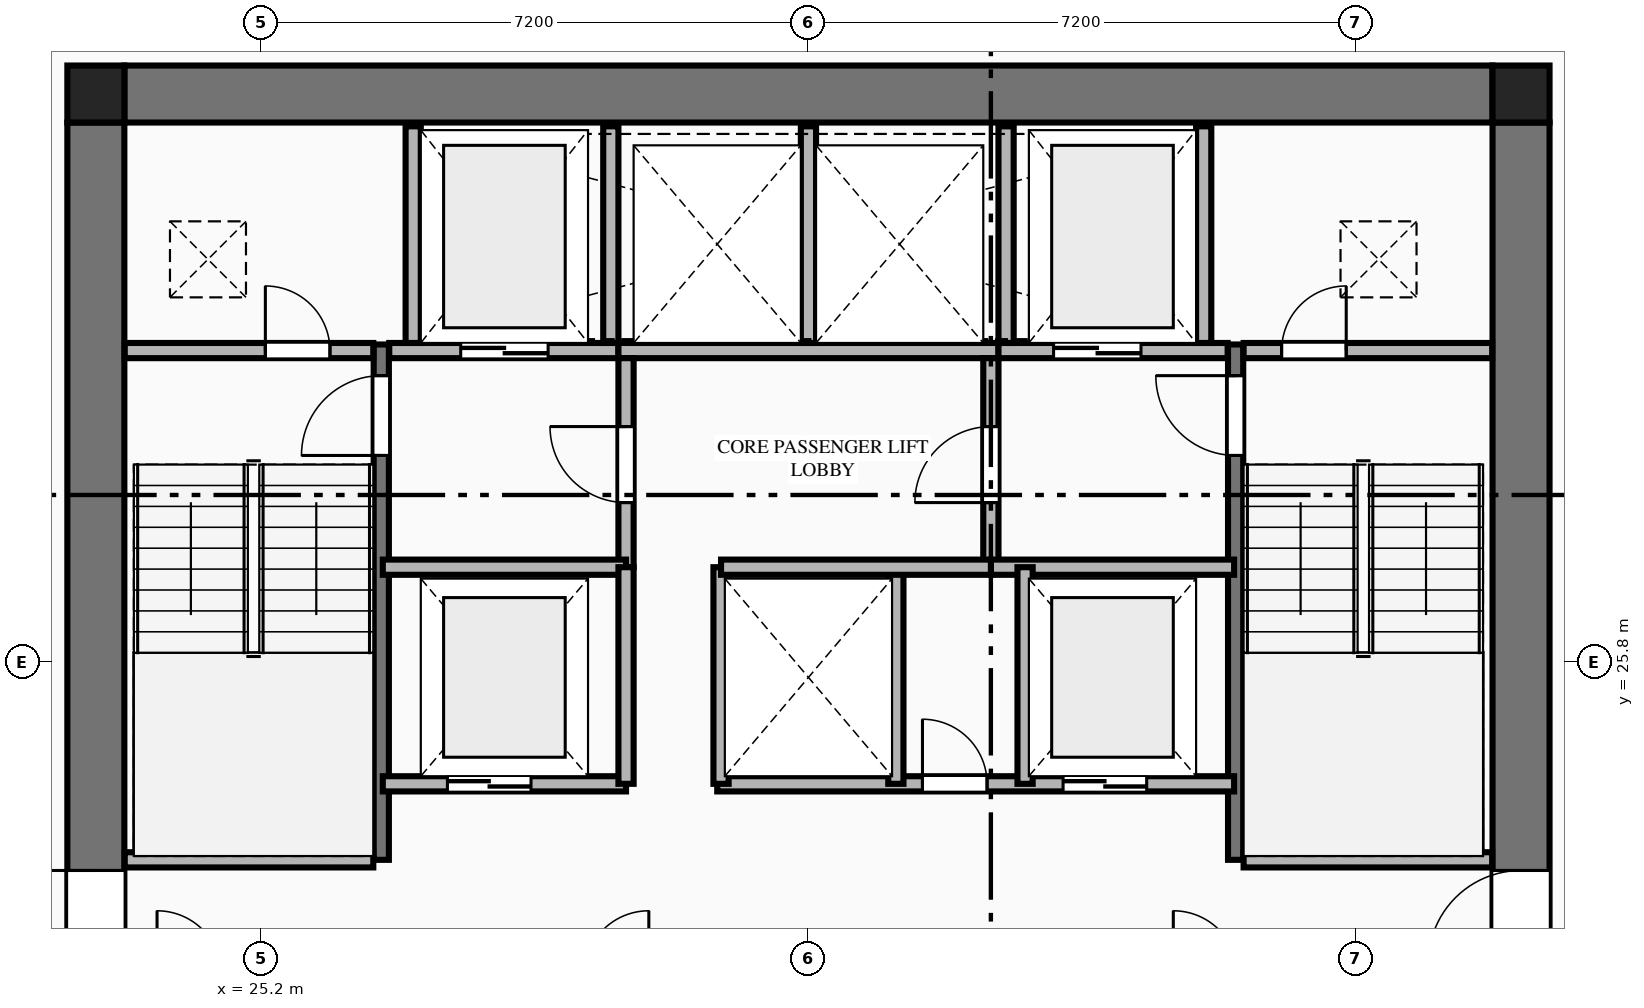
"""IFC4 building model, lengths in metres.
Left out: names, types, materials, properties, quantities, classifications, styles, units other than length and angle.
Written with IfcOpenShell. Run it as: python <this file> out.ifc"""

import sys

from ifc_helpers import new_model, si_unit, direction, frame, frame_2d, origin, origin_2d, place, context, subcontext, project, spatial, rectangle, extrude, element, fill, save


model = new_model("IFC4")
c1 = context("Model", 3, precision=1e-05, world=origin(), true_north=direction((0.0, 1.0)))
c2 = subcontext(c1, "Body", "Model", "MODEL_VIEW")
j1 = project(units=[si_unit("LENGTHUNIT", "METRE"), si_unit("PLANEANGLEUNIT", "RADIAN")], contexts=[c1])
p1 = place(None, origin())
s1 = spatial("IfcSite", under=j1, at=p1, CompositionType="ELEMENT")
p2 = place(p1, origin())
s2 = spatial("IfcBuilding", under=s1, at=p2, CompositionType="ELEMENT")
p3 = place(p2, frame((0.0, 0.0, 126.8)))
s3 = spatial("IfcBuildingStorey", under=s2, at=p3, CompositionType="ELEMENT", Elevation=126.8)
for number, where, z_axis, x_axis in (
    (1, (41.775, 33.275, 0.0), (0.0, 0.0, 1.0), (1.0, 0.0, 0.0)),
    (2, (23.025, 33.275, 0.0), (0.0, 0.0, 1.0), (1.0, 0.0, 0.0)),
):
    element("IfcColumn", number, at=place(p3, frame(where, z_axis=z_axis, x_axis=x_axis)), inside=s3, PredefinedType="COLUMN", context=c2, shape_type="SweptSolid", body=[
        extrude(rectangle(XDim=0.75, YDim=0.75, at=origin_2d()), origin(), (0.0, 0.0, 1.0), 3.55),
    ])
p4 = place(p3, frame((23.4, 33.275, 0.0), z_axis=(0.0, 0.0, 1.0), x_axis=(1.0, 0.0, 0.0)))
e3 = element("IfcWall", 3, at=p4, inside=s3, PredefinedType="SHEAR", context=c2, shape_type="SweptSolid", body=[
    extrude(rectangle(XDim=18.0, YDim=0.75, at=frame_2d((9.0, 0.0))), origin(), (0.0, 0.0, 1.0), 3.34),
])
p5 = place(p3, frame((23.025, 18.9, 0.0), z_axis=(0.0, 0.0, 1.0), x_axis=(0.0, 1.0, 0.0)))
e4 = element("IfcWall", 4, at=p5, inside=s3, PredefinedType="SHEAR", context=c2, shape_type="SweptSolid", body=[
    extrude(rectangle(XDim=14.0, YDim=0.75, at=frame_2d((7.0, 0.0))), origin(), (0.0, 0.0, 1.0), 3.34),
])
p6 = place(p5, frame((2.94, 0.0, 0.0)))
e5 = element("IfcOpeningElement", 5, at=p6, cuts=e4, PredefinedType="OPENING", context=c2, shape_type="SweptSolid", body=[
    extrude(rectangle(XDim=1.22, YDim=2.25, at=frame_2d((0.61, 1.125))), frame((0.0, 0.385, 0.0), z_axis=(0.0, -1.0, 0.0), x_axis=(1.0, 0.0, 0.0)), (0.0, 0.0, 1.0), 0.77),
])
p7 = place(p3, frame((41.775, 18.9, 0.0), z_axis=(0.0, 0.0, 1.0), x_axis=(0.0, 1.0, 0.0)))
e6 = element("IfcWall", 6, at=p7, inside=s3, PredefinedType="SHEAR", context=c2, shape_type="SweptSolid", body=[
    extrude(rectangle(XDim=14.0, YDim=0.75, at=frame_2d((7.0, 0.0))), origin(), (0.0, 0.0, 1.0), 3.34),
])
p8 = place(p7, frame((2.94, 0.0, 0.0)))
e7 = element("IfcOpeningElement", 7, at=p8, cuts=e6, PredefinedType="OPENING", context=c2, shape_type="SweptSolid", body=[
    extrude(rectangle(XDim=1.22, YDim=2.25, at=frame_2d((0.61, 1.125))), frame((0.0, 0.385, 0.0), z_axis=(0.0, -1.0, 0.0), x_axis=(1.0, 0.0, 0.0)), (0.0, 0.0, 1.0), 0.77),
])
p9 = place(p3, frame((26.78, 23.2, 0.0), z_axis=(0.0, 0.0, 1.0), x_axis=(0.0, 1.0, 0.0)))
e8 = element("IfcWall", 8, at=p9, inside=s3, PredefinedType="SHEAR", context=c2, shape_type="SweptSolid", body=[
    extrude(rectangle(XDim=6.78, YDim=0.2, at=frame_2d((3.39, 0.0))), origin(), (0.0, 0.0, 1.0), 3.55),
])
p10 = place(p9, frame((5.32, 0.0, 0.0)))
e9 = element("IfcOpeningElement", 9, at=p10, cuts=e8, PredefinedType="OPENING", context=c2, shape_type="SweptSolid", body=[
    extrude(rectangle(XDim=1.05, YDim=2.15, at=frame_2d((0.525, 1.075))), frame((0.0, 0.11, 0.0), z_axis=(0.0, -1.0, 0.0), x_axis=(1.0, 0.0, 0.0)), (0.0, 0.0, 1.0), 0.22),
])
p11 = place(p3, frame((23.405, 23.2, 0.0), z_axis=(0.0, 0.0, 1.0), x_axis=(1.0, 0.0, 0.0)))
e10 = element("IfcWall", 10, at=p11, inside=s3, PredefinedType="PLUMBINGWALL", context=c2, shape_type="SweptSolid", body=[
    extrude(rectangle(XDim=3.27, YDim=0.2, at=frame_2d((1.635, 0.0))), origin(), (0.0, 0.0, 1.0), 3.34),
])
p12 = place(p3, frame((38.02, 23.2, 0.0), z_axis=(0.0, 0.0, 1.0), x_axis=(0.0, 1.0, 0.0)))
e11 = element("IfcWall", 11, at=p12, inside=s3, PredefinedType="SHEAR", context=c2, shape_type="SweptSolid", body=[
    extrude(rectangle(XDim=6.78, YDim=0.2, at=frame_2d((3.39, 0.0))), origin(), (0.0, 0.0, 1.0), 3.55),
])
p13 = place(p12, frame((5.32, 0.0, 0.0)))
e12 = element("IfcOpeningElement", 12, at=p13, cuts=e11, PredefinedType="OPENING", context=c2, shape_type="SweptSolid", body=[
    extrude(rectangle(XDim=1.05, YDim=2.15, at=frame_2d((0.525, 1.075))), frame((0.0, 0.11, 0.0), z_axis=(0.0, -1.0, 0.0), x_axis=(1.0, 0.0, 0.0)), (0.0, 0.0, 1.0), 0.22),
])
p14 = place(p3, frame((38.125, 23.2, 0.0), z_axis=(0.0, 0.0, 1.0), x_axis=(1.0, 0.0, 0.0)))
e13 = element("IfcWall", 13, at=p14, inside=s3, PredefinedType="PLUMBINGWALL", context=c2, shape_type="SweptSolid", body=[
    extrude(rectangle(XDim=3.27, YDim=0.2, at=frame_2d((1.635, 0.0))), origin(), (0.0, 0.0, 1.0), 3.34),
])
p15 = place(p3, frame((23.405, 29.9, 0.0), z_axis=(0.0, 0.0, 1.0), x_axis=(1.0, 0.0, 0.0)))
e14 = element("IfcWall", 14, at=p15, inside=s3, PredefinedType="PLUMBINGWALL", context=c2, shape_type="SweptSolid", body=[
    extrude(rectangle(XDim=3.27, YDim=0.2, at=frame_2d((1.635, 0.0))), origin(), (0.0, 0.0, 1.0), 3.34),
])
p16 = place(p15, frame((1.85, 0.0, 0.0)))
e15 = element("IfcOpeningElement", 15, at=p16, cuts=e14, PredefinedType="OPENING", context=c2, shape_type="SweptSolid", body=[
    extrude(rectangle(XDim=0.85, YDim=2.05, at=frame_2d((0.425, 1.025))), frame((0.0, 0.11, 0.0), z_axis=(0.0, -1.0, 0.0), x_axis=(1.0, 0.0, 0.0)), (0.0, 0.0, 1.0), 0.22),
])
p17 = place(p3, frame((26.885, 29.9, 0.0), z_axis=(0.0, 0.0, 1.0), x_axis=(1.0, 0.0, 0.0)))
e16 = element("IfcWall", 16, at=p17, inside=s3, PredefinedType="PLUMBINGWALL", context=c2, shape_type="SweptSolid", body=[
    extrude(rectangle(XDim=3.015, YDim=0.2, at=frame_2d((1.507, 0.0))), origin(), (0.0, 0.0, 1.0), 3.34),
])
p18 = place(p17, frame((0.94, 0.0, 0.0)))
e17 = element("IfcOpeningElement", 17, at=p18, cuts=e16, PredefinedType="OPENING", context=c2, shape_type="SweptSolid", body=[
    extrude(rectangle(XDim=1.15, YDim=2.2, at=frame_2d((0.575, 1.1))), frame((0.0, 0.11, 0.0), z_axis=(0.0, -1.0, 0.0), x_axis=(1.0, 0.0, 0.0)), (0.0, 0.0, 1.0), 0.22),
])
p19 = place(p3, frame((29.9, 29.9, 0.0), z_axis=(0.0, 0.0, 1.0), x_axis=(1.0, 0.0, 0.0)))
e18 = element("IfcWall", 18, at=p19, inside=s3, PredefinedType="PLUMBINGWALL", context=c2, shape_type="SweptSolid", body=[
    extrude(rectangle(XDim=5.0, YDim=0.2, at=frame_2d((2.5, 0.0))), origin(), (0.0, 0.0, 1.0), 3.34),
])
p20 = place(p3, frame((34.9, 29.9, 0.0), z_axis=(0.0, 0.0, 1.0), x_axis=(1.0, 0.0, 0.0)))
e19 = element("IfcWall", 19, at=p20, inside=s3, PredefinedType="PLUMBINGWALL", context=c2, shape_type="SweptSolid", body=[
    extrude(rectangle(XDim=3.015, YDim=0.2, at=frame_2d((1.508, 0.0))), origin(), (0.0, 0.0, 1.0), 3.34),
])
p21 = place(p20, frame((0.725, 0.0, 0.0)))
e20 = element("IfcOpeningElement", 20, at=p21, cuts=e19, PredefinedType="OPENING", context=c2, shape_type="SweptSolid", body=[
    extrude(rectangle(XDim=1.15, YDim=2.2, at=frame_2d((0.575, 1.1))), frame((0.0, 0.11, 0.0), z_axis=(0.0, -1.0, 0.0), x_axis=(1.0, 0.0, 0.0)), (0.0, 0.0, 1.0), 0.22),
])
p22 = place(p3, frame((38.125, 29.9, 0.0), z_axis=(0.0, 0.0, 1.0), x_axis=(1.0, 0.0, 0.0)))
e21 = element("IfcWall", 21, at=p22, inside=s3, PredefinedType="PLUMBINGWALL", context=c2, shape_type="SweptSolid", body=[
    extrude(rectangle(XDim=3.27, YDim=0.2, at=frame_2d((1.635, 0.0))), origin(), (0.0, 0.0, 1.0), 3.34),
])
p23 = place(p22, frame((0.5, 0.0, 0.0)))
e22 = element("IfcOpeningElement", 22, at=p23, cuts=e21, PredefinedType="OPENING", context=c2, shape_type="SweptSolid", body=[
    extrude(rectangle(XDim=0.85, YDim=2.05, at=frame_2d((0.425, 1.025))), frame((0.0, 0.11, 0.0), z_axis=(0.0, -1.0, 0.0), x_axis=(1.0, 0.0, 0.0)), (0.0, 0.0, 1.0), 0.22),
])
for number, where, z_axis, x_axis in (
    (23, (27.2, 30.0, 0.0), (0.0, 0.0, 1.0), (0.0, 1.0, 0.0)),
    (24, (29.8, 30.0, 0.0), (0.0, 0.0, 1.0), (0.0, 1.0, 0.0)),
    (25, (32.4, 30.0, 0.0), (0.0, 0.0, 1.0), (0.0, 1.0, 0.0)),
    (26, (35.0, 30.0, 0.0), (0.0, 0.0, 1.0), (0.0, 1.0, 0.0)),
    (27, (37.6, 30.0, 0.0), (0.0, 0.0, 1.0), (0.0, 1.0, 0.0)),
):
    element("IfcWall", number, at=place(p3, frame(where, z_axis=z_axis, x_axis=x_axis)), inside=s3, PredefinedType="PLUMBINGWALL", context=c2, shape_type="SweptSolid", body=[
        extrude(rectangle(XDim=2.85, YDim=0.2, at=frame_2d((1.425, 0.0))), origin(), (0.0, 0.0, 1.0), 3.34),
    ])
p24 = place(p3, frame((30.0, 27.05, 0.0), z_axis=(0.0, 0.0, 1.0), x_axis=(0.0, 1.0, 0.0)))
e28 = element("IfcWall", 28, at=p24, inside=s3, PredefinedType="PLUMBINGWALL", context=c2, shape_type="SweptSolid", body=[
    extrude(rectangle(XDim=2.75, YDim=0.2, at=frame_2d((1.375, 0.0))), origin(), (0.0, 0.0, 1.0), 3.34),
])
p25 = place(p24, frame((0.85, 0.0, 0.0)))
e29 = element("IfcOpeningElement", 29, at=p25, cuts=e28, PredefinedType="OPENING", context=c2, shape_type="SweptSolid", body=[
    extrude(rectangle(XDim=1.0, YDim=2.15, at=frame_2d((0.5, 1.075))), frame((0.0, 0.11, 0.0), z_axis=(0.0, -1.0, 0.0), x_axis=(1.0, 0.0, 0.0)), (0.0, 0.0, 1.0), 0.22),
])
p26 = place(p3, frame((26.8, 27.05, 0.0), z_axis=(0.0, 0.0, 1.0), x_axis=(1.0, 0.0, 0.0)))
e30 = element("IfcWall", 30, at=p26, inside=s3, PredefinedType="PLUMBINGWALL", context=c2, shape_type="SweptSolid", body=[
    extrude(rectangle(XDim=3.2, YDim=0.2, at=frame_2d((1.6, 0.0))), origin(), (0.0, 0.0, 1.0), 3.34),
])
p27 = place(p3, frame((34.8, 27.05, 0.0), z_axis=(0.0, 0.0, 1.0), x_axis=(0.0, 1.0, 0.0)))
e31 = element("IfcWall", 31, at=p27, inside=s3, PredefinedType="PLUMBINGWALL", context=c2, shape_type="SweptSolid", body=[
    extrude(rectangle(XDim=2.75, YDim=0.2, at=frame_2d((1.375, 0.0))), origin(), (0.0, 0.0, 1.0), 3.34),
])
p28 = place(p27, frame((0.85, 0.0, 0.0)))
e32 = element("IfcOpeningElement", 32, at=p28, cuts=e31, PredefinedType="OPENING", context=c2, shape_type="SweptSolid", body=[
    extrude(rectangle(XDim=1.0, YDim=2.15, at=frame_2d((0.5, 1.075))), frame((0.0, 0.11, 0.0), z_axis=(0.0, -1.0, 0.0), x_axis=(1.0, 0.0, 0.0)), (0.0, 0.0, 1.0), 0.22),
])
p29 = place(p3, frame((34.8, 27.05, 0.0), z_axis=(0.0, 0.0, 1.0), x_axis=(1.0, 0.0, 0.0)))
e33 = element("IfcWall", 33, at=p29, inside=s3, PredefinedType="PLUMBINGWALL", context=c2, shape_type="SweptSolid", body=[
    extrude(rectangle(XDim=3.2, YDim=0.2, at=frame_2d((1.6, 0.0))), origin(), (0.0, 0.0, 1.0), 3.34),
])
p30 = place(p3, frame((26.8, 24.2, 0.0), z_axis=(0.0, 0.0, 1.0), x_axis=(1.0, 0.0, 0.0)))
e34 = element("IfcWall", 34, at=p30, inside=s3, PredefinedType="PLUMBINGWALL", context=c2, shape_type="SweptSolid", body=[
    extrude(rectangle(XDim=3.2, YDim=0.2, at=frame_2d((1.6, 0.0))), origin(), (0.0, 0.0, 1.0), 3.34),
])
p31 = place(p30, frame((0.85, 0.0, 0.0)))
e35 = element("IfcOpeningElement", 35, at=p31, cuts=e34, PredefinedType="OPENING", context=c2, shape_type="SweptSolid", body=[
    extrude(rectangle(XDim=1.1, YDim=2.2, at=frame_2d((0.55, 1.1))), frame((0.0, 0.11, 0.0), z_axis=(0.0, -1.0, 0.0), x_axis=(1.0, 0.0, 0.0)), (0.0, 0.0, 1.0), 0.22),
])
p32 = place(p3, frame((30.0, 24.2, 0.0), z_axis=(0.0, 0.0, 1.0), x_axis=(0.0, 1.0, 0.0)))
e36 = element("IfcWall", 36, at=p32, inside=s3, PredefinedType="PLUMBINGWALL", context=c2, shape_type="SweptSolid", body=[
    extrude(rectangle(XDim=2.85, YDim=0.2, at=frame_2d((1.425, 0.0))), origin(), (0.0, 0.0, 1.0), 3.34),
])
p33 = place(p3, frame((31.2, 24.2, 0.0), z_axis=(0.0, 0.0, 1.0), x_axis=(1.0, 0.0, 0.0)))
e37 = element("IfcWall", 37, at=p33, inside=s3, PredefinedType="PLUMBINGWALL", context=c2, shape_type="SweptSolid", body=[
    extrude(rectangle(XDim=6.8, YDim=0.2, at=frame_2d((3.4, 0.0))), origin(), (0.0, 0.0, 1.0), 3.34),
])
p34 = place(p33, frame((2.7, 0.0, 0.0)))
e38 = element("IfcOpeningElement", 38, at=p34, cuts=e37, PredefinedType="OPENING", context=c2, shape_type="SweptSolid", body=[
    extrude(rectangle(XDim=0.85, YDim=2.05, at=frame_2d((0.425, 1.025))), frame((0.0, 0.11, 0.0), z_axis=(0.0, -1.0, 0.0), x_axis=(1.0, 0.0, 0.0)), (0.0, 0.0, 1.0), 0.22),
])
p35 = place(p33, frame((4.55, 0.0, 0.0)))
e39 = element("IfcOpeningElement", 39, at=p35, cuts=e37, PredefinedType="OPENING", context=c2, shape_type="SweptSolid", body=[
    extrude(rectangle(XDim=1.1, YDim=2.2, at=frame_2d((0.55, 1.1))), frame((0.0, 0.11, 0.0), z_axis=(0.0, -1.0, 0.0), x_axis=(1.0, 0.0, 0.0)), (0.0, 0.0, 1.0), 0.22),
])
for number, where, z_axis, x_axis in (
    (40, (31.25, 24.2, 0.0), (0.0, 0.0, 1.0), (0.0, 1.0, 0.0)),
    (41, (33.55, 24.2, 0.0), (0.0, 0.0, 1.0), (0.0, 1.0, 0.0)),
    (42, (35.25, 24.2, 0.0), (0.0, 0.0, 1.0), (0.0, 1.0, 0.0)),
):
    element("IfcWall", number, at=place(p3, frame(where, z_axis=z_axis, x_axis=x_axis)), inside=s3, PredefinedType="PLUMBINGWALL", context=c2, shape_type="SweptSolid", body=[
        extrude(rectangle(XDim=2.85, YDim=0.2, at=frame_2d((1.425, 0.0))), origin(), (0.0, 0.0, 1.0), 3.34),
    ])
p36 = place(p3, frame((31.25, 27.05, 0.0), z_axis=(0.0, 0.0, 1.0), x_axis=(1.0, 0.0, 0.0)))
e43 = element("IfcWall", 43, at=p36, inside=s3, PredefinedType="PLUMBINGWALL", context=c2, shape_type="SweptSolid", body=[
    extrude(rectangle(XDim=3.55, YDim=0.2, at=frame_2d((1.775, 0.0))), origin(), (0.0, 0.0, 1.0), 3.34),
])
p37 = place(p6, origin())
e44 = element("IfcDoor", 44, at=p37, inside=s3, OperationType="SINGLE_SWING_RIGHT", PredefinedType="DOOR", context=c2, shape_type="SweptSolid", body=[
    extrude(rectangle(XDim=1.22, YDim=2.25, at=frame_2d((0.61, 1.125))), frame((0.0, 0.025, 0.0), z_axis=(0.0, -1.0, 0.0), x_axis=(1.0, 0.0, 0.0)), (0.0, 0.0, 1.0), 0.05),
])
fill(e5, e44)
p38 = place(p8, origin())
e45 = element("IfcDoor", 45, at=p38, inside=s3, OperationType="SINGLE_SWING_LEFT", PredefinedType="DOOR", context=c2, shape_type="SweptSolid", body=[
    extrude(rectangle(XDim=1.22, YDim=2.25, at=frame_2d((0.61, 1.125))), frame((0.0, 0.025, 0.0), z_axis=(0.0, -1.0, 0.0), x_axis=(1.0, 0.0, 0.0)), (0.0, 0.0, 1.0), 0.05),
])
fill(e7, e45)
p39 = place(p10, origin())
e46 = element("IfcDoor", 46, at=p39, inside=s3, OperationType="SINGLE_SWING_LEFT", PredefinedType="DOOR", context=c2, shape_type="SweptSolid", body=[
    extrude(rectangle(XDim=1.05, YDim=2.15, at=frame_2d((0.525, 1.075))), frame((0.0, 0.025, 0.0), z_axis=(0.0, -1.0, 0.0), x_axis=(1.0, 0.0, 0.0)), (0.0, 0.0, 1.0), 0.05),
])
fill(e9, e46)
p40 = place(p13, origin())
e47 = element("IfcDoor", 47, at=p40, inside=s3, OperationType="SINGLE_SWING_RIGHT", PredefinedType="DOOR", context=c2, shape_type="SweptSolid", body=[
    extrude(rectangle(XDim=1.05, YDim=2.15, at=frame_2d((0.525, 1.075))), frame((0.0, 0.025, 0.0), z_axis=(0.0, -1.0, 0.0), x_axis=(1.0, 0.0, 0.0)), (0.0, 0.0, 1.0), 0.05),
])
fill(e12, e47)
p41 = place(p16, origin())
e48 = element("IfcDoor", 48, at=p41, inside=s3, OperationType="SINGLE_SWING_LEFT", PredefinedType="DOOR", context=c2, shape_type="SweptSolid", body=[
    extrude(rectangle(XDim=0.85, YDim=2.05, at=frame_2d((0.425, 1.025))), frame((0.0, 0.025, 0.0), z_axis=(0.0, -1.0, 0.0), x_axis=(1.0, 0.0, 0.0)), (0.0, 0.0, 1.0), 0.05),
])
fill(e15, e48)
p42 = place(p23, origin())
e49 = element("IfcDoor", 49, at=p42, inside=s3, OperationType="SINGLE_SWING_RIGHT", PredefinedType="DOOR", context=c2, shape_type="SweptSolid", body=[
    extrude(rectangle(XDim=0.85, YDim=2.05, at=frame_2d((0.425, 1.025))), frame((0.0, 0.025, 0.0), z_axis=(0.0, -1.0, 0.0), x_axis=(1.0, 0.0, 0.0)), (0.0, 0.0, 1.0), 0.05),
])
fill(e22, e49)
p43 = place(p18, origin())
e50 = element("IfcDoor", 50, at=p43, inside=s3, OperationType="DOUBLE_DOOR_SLIDING", PredefinedType="DOOR", context=c2, shape_type="SweptSolid", body=[
    extrude(rectangle(XDim=1.15, YDim=2.2, at=frame_2d((0.575, 1.1))), frame((0.0, 0.025, 0.0), z_axis=(0.0, -1.0, 0.0), x_axis=(1.0, 0.0, 0.0)), (0.0, 0.0, 1.0), 0.05),
])
fill(e17, e50)
p44 = place(p21, origin())
e51 = element("IfcDoor", 51, at=p44, inside=s3, OperationType="DOUBLE_DOOR_SLIDING", PredefinedType="DOOR", context=c2, shape_type="SweptSolid", body=[
    extrude(rectangle(XDim=1.15, YDim=2.2, at=frame_2d((0.575, 1.1))), frame((0.0, 0.025, 0.0), z_axis=(0.0, -1.0, 0.0), x_axis=(1.0, 0.0, 0.0)), (0.0, 0.0, 1.0), 0.05),
])
fill(e20, e51)
p45 = place(p25, origin())
e52 = element("IfcDoor", 52, at=p45, inside=s3, OperationType="SINGLE_SWING_RIGHT", PredefinedType="DOOR", context=c2, shape_type="SweptSolid", body=[
    extrude(rectangle(XDim=1.0, YDim=2.15, at=frame_2d((0.5, 1.075))), frame((0.0, 0.025, 0.0), z_axis=(0.0, -1.0, 0.0), x_axis=(1.0, 0.0, 0.0)), (0.0, 0.0, 1.0), 0.05),
])
fill(e29, e52)
p46 = place(p28, origin())
e53 = element("IfcDoor", 53, at=p46, inside=s3, OperationType="SINGLE_SWING_LEFT", PredefinedType="DOOR", context=c2, shape_type="SweptSolid", body=[
    extrude(rectangle(XDim=1.0, YDim=2.15, at=frame_2d((0.5, 1.075))), frame((0.0, 0.025, 0.0), z_axis=(0.0, -1.0, 0.0), x_axis=(1.0, 0.0, 0.0)), (0.0, 0.0, 1.0), 0.05),
])
fill(e32, e53)
p47 = place(p31, origin())
e54 = element("IfcDoor", 54, at=p47, inside=s3, OperationType="DOUBLE_DOOR_SLIDING", PredefinedType="DOOR", context=c2, shape_type="SweptSolid", body=[
    extrude(rectangle(XDim=1.1, YDim=2.2, at=frame_2d((0.55, 1.1))), frame((0.0, 0.025, 0.0), z_axis=(0.0, -1.0, 0.0), x_axis=(1.0, 0.0, 0.0)), (0.0, 0.0, 1.0), 0.05),
])
fill(e35, e54)
p48 = place(p34, origin())
e55 = element("IfcDoor", 55, at=p48, inside=s3, OperationType="SINGLE_SWING_LEFT", PredefinedType="DOOR", context=c2, shape_type="SweptSolid", body=[
    extrude(rectangle(XDim=0.85, YDim=2.05, at=frame_2d((0.425, 1.025))), frame((0.0, 0.025, 0.0), z_axis=(0.0, -1.0, 0.0), x_axis=(1.0, 0.0, 0.0)), (0.0, 0.0, 1.0), 0.05),
])
fill(e38, e55)
p49 = place(p35, origin())
e56 = element("IfcDoor", 56, at=p49, inside=s3, OperationType="DOUBLE_DOOR_SLIDING", PredefinedType="DOOR", context=c2, shape_type="SweptSolid", body=[
    extrude(rectangle(XDim=1.1, YDim=2.2, at=frame_2d((0.55, 1.1))), frame((0.0, 0.025, 0.0), z_axis=(0.0, -1.0, 0.0), x_axis=(1.0, 0.0, 0.0)), (0.0, 0.0, 1.0), 0.05),
])
fill(e39, e56)
save(model, sys.argv[1])
